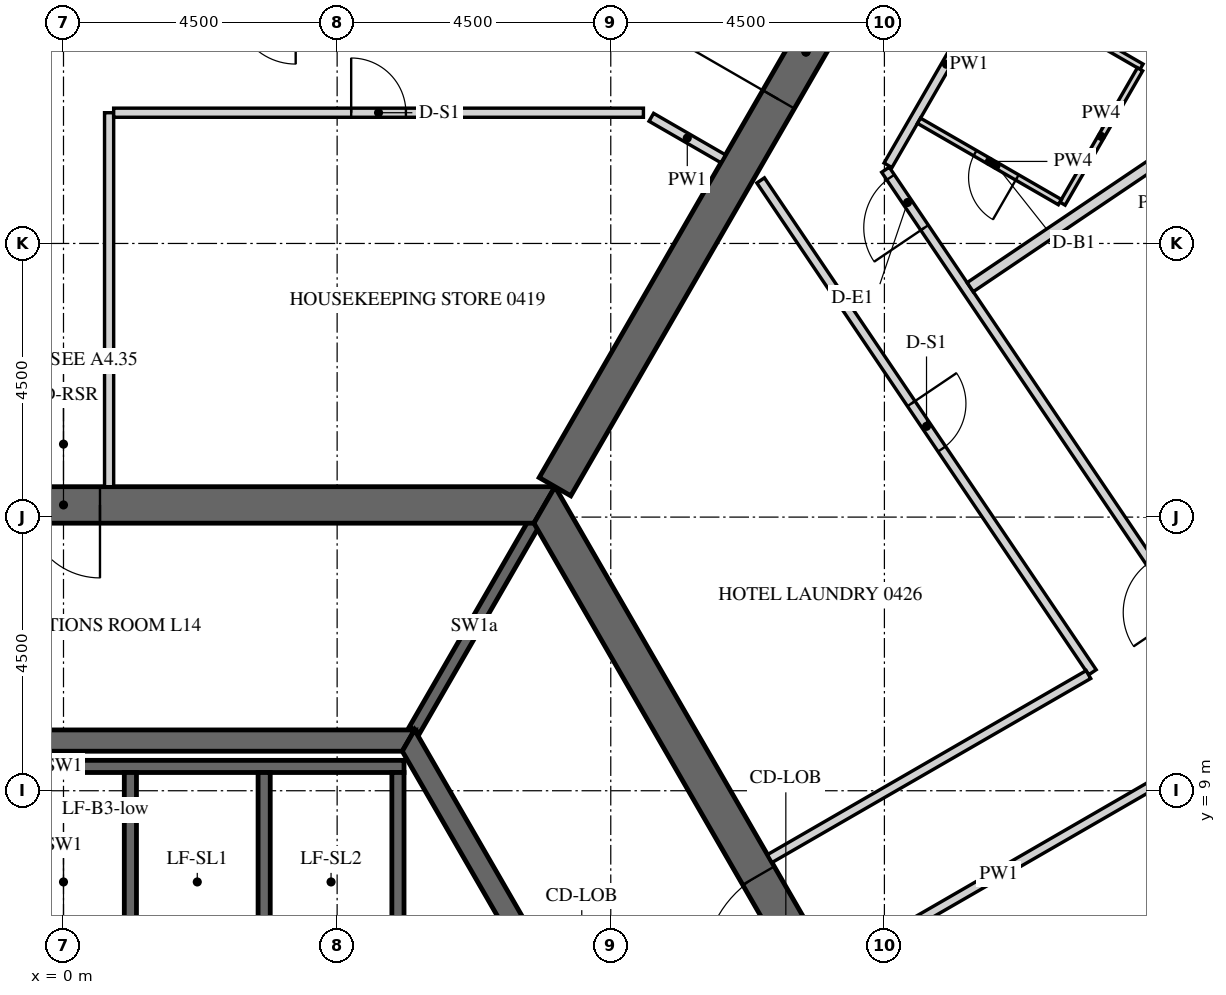
"""IFC4 building model, lengths in metres.
Left out: names, types, materials, properties, quantities, classifications, styles, units other than length and angle.
Written with IfcOpenShell. Run it as: python <this file> out.ifc"""

import sys

from ifc_helpers import new_model, si_unit, direction, frame, frame_2d, origin, place, context, subcontext, project, spatial, polyline, rectangle, outline, extrude, element, fill, save


model = new_model("IFC4")
c1 = context("Model", 3, precision=1e-05, world=origin(), true_north=direction((0.0, 1.0)))
c2 = subcontext(c1, "Body", "Model", "MODEL_VIEW")
j1 = project(units=[si_unit("LENGTHUNIT", "METRE"), si_unit("PLANEANGLEUNIT", "RADIAN")], contexts=[c1])
p1 = place(None, origin())
s1 = spatial("IfcSite", under=j1, at=p1, CompositionType="ELEMENT")
p2 = place(p1, origin())
s2 = spatial("IfcBuilding", under=s1, at=p2, CompositionType="ELEMENT")
p3 = place(p2, frame((0.0, 0.0, 68.7)))
s3 = spatial("IfcBuildingStorey", under=s2, at=p3, CompositionType="ELEMENT", Elevation=68.7)
p4 = place(p3, frame((33.728, 3.153, -0.15), z_axis=(0.0, 0.0, 1.0), x_axis=(-0.559192411416, 0.82903790445, 0.0)))
e1 = element("IfcWall", 1, at=p4, inside=s3, PredefinedType="SOLIDWALL", context=c2, shape_type="SweptSolid", body=[
    extrude(outline(polyline([(-0.026, -0.275), (30.093, -0.275), (30.048, 0.275), (0.026, 0.275), (-0.026, -0.275)])), origin(), (0.0, 0.0, 1.0), 3.9),
])
p5 = place(p4, frame((1.236, 0.0, 1.05)))
e2 = element("IfcOpeningElement", 2, at=p5, cuts=e1, PredefinedType="OPENING", context=c2, shape_type="SweptSolid", body=[
    extrude(rectangle(XDim=2.4, YDim=2.4, at=frame_2d((1.2, 1.2))), frame((0.0, 0.285, 0.0), z_axis=(0.0, -1.0, 0.0), x_axis=(1.0, 0.0, 0.0)), (0.0, 0.0, 1.0), 0.57),
])
p6 = place(p4, frame((4.835, 0.0, 1.05)))
e3 = element("IfcOpeningElement", 3, at=p6, cuts=e1, PredefinedType="OPENING", context=c2, shape_type="SweptSolid", body=[
    extrude(rectangle(XDim=2.4, YDim=2.4, at=frame_2d((1.2, 1.2))), frame((0.0, 0.285, 0.0), z_axis=(0.0, -1.0, 0.0), x_axis=(1.0, 0.0, 0.0)), (0.0, 0.0, 1.0), 0.57),
])
p7 = place(p4, frame((8.436, 0.0, 1.05)))
e4 = element("IfcOpeningElement", 4, at=p7, cuts=e1, PredefinedType="OPENING", context=c2, shape_type="SweptSolid", body=[
    extrude(rectangle(XDim=2.4, YDim=2.4, at=frame_2d((1.2, 1.2))), frame((0.0, 0.285, 0.0), z_axis=(0.0, -1.0, 0.0), x_axis=(1.0, 0.0, 0.0)), (0.0, 0.0, 1.0), 0.57),
])
p8 = place(p4, frame((12.035, 0.0, 1.05)))
e5 = element("IfcOpeningElement", 5, at=p8, cuts=e1, PredefinedType="OPENING", context=c2, shape_type="SweptSolid", body=[
    extrude(rectangle(XDim=2.4, YDim=2.4, at=frame_2d((1.2, 1.2))), frame((0.0, 0.285, 0.0), z_axis=(0.0, -1.0, 0.0), x_axis=(1.0, 0.0, 0.0)), (0.0, 0.0, 1.0), 0.57),
])
p9 = place(p4, frame((15.635, 0.0, 1.05)))
e6 = element("IfcOpeningElement", 6, at=p9, cuts=e1, PredefinedType="OPENING", context=c2, shape_type="SweptSolid", body=[
    extrude(rectangle(XDim=2.4, YDim=2.4, at=frame_2d((1.2, 1.2))), frame((0.0, 0.285, 0.0), z_axis=(0.0, -1.0, 0.0), x_axis=(1.0, 0.0, 0.0)), (0.0, 0.0, 1.0), 0.57),
])
p10 = place(p4, frame((19.236, 0.0, 1.05)))
e7 = element("IfcOpeningElement", 7, at=p10, cuts=e1, PredefinedType="OPENING", context=c2, shape_type="SweptSolid", body=[
    extrude(rectangle(XDim=2.4, YDim=2.4, at=frame_2d((1.2, 1.2))), frame((0.0, 0.285, 0.0), z_axis=(0.0, -1.0, 0.0), x_axis=(1.0, 0.0, 0.0)), (0.0, 0.0, 1.0), 0.57),
])
p11 = place(p4, frame((22.835, 0.0, 1.05)))
e8 = element("IfcOpeningElement", 8, at=p11, cuts=e1, PredefinedType="OPENING", context=c2, shape_type="SweptSolid", body=[
    extrude(rectangle(XDim=2.4, YDim=2.4, at=frame_2d((1.2, 1.2))), frame((0.0, 0.285, 0.0), z_axis=(0.0, -1.0, 0.0), x_axis=(1.0, 0.0, 0.0)), (0.0, 0.0, 1.0), 0.57),
])
p12 = place(p4, frame((26.436, 0.0, 1.05)))
e9 = element("IfcOpeningElement", 9, at=p12, cuts=e1, PredefinedType="OPENING", context=c2, shape_type="SweptSolid", body=[
    extrude(rectangle(XDim=2.4, YDim=2.4, at=frame_2d((1.2, 1.2))), frame((0.0, 0.285, 0.0), z_axis=(0.0, -1.0, 0.0), x_axis=(1.0, 0.0, 0.0)), (0.0, 0.0, 1.0), 0.57),
])
p13 = place(p3, frame((15.819, 0.0, -0.15), z_axis=(0.0, 0.0, 1.0), x_axis=(-0.499999880136, 0.866025472988, 0.0)))
e10 = element("IfcWall", 10, at=p13, inside=s3, PredefinedType="SHEAR", context=c2, shape_type="SweptSolid", body=[
    extrude(outline(polyline([(-0.173, -0.3), (15.993, -0.3), (15.646, 0.3), (0.173, 0.3), (-0.173, -0.3)])), origin(), (0.0, 0.0, 1.0), 3.9),
])
p14 = place(p13, frame((6.981, 0.0, 0.15)))
e11 = element("IfcOpeningElement", 11, at=p14, cuts=e10, PredefinedType="OPENING", context=c2, shape_type="SweptSolid", body=[
    extrude(rectangle(XDim=1.8, YDim=2.4, at=frame_2d((0.9, 1.2))), frame((0.0, 0.31, 0.0), z_axis=(0.0, -1.0, 0.0), x_axis=(1.0, 0.0, 0.0)), (0.0, 0.0, 1.0), 0.62),
])
p15 = place(p3, frame((7.91, 13.7, -0.15), z_axis=(0.0, 0.0, 1.0), x_axis=(-1.0, 0.0, 0.0)))
e12 = element("IfcWall", 12, at=p15, inside=s3, PredefinedType="SHEAR", context=c2, shape_type="SweptSolid", body=[
    extrude(outline(polyline([(-0.173, -0.3), (15.993, -0.3), (15.646, 0.3), (0.173, 0.3), (-0.173, -0.3)])), origin(), (0.0, 0.0, 1.0), 3.9),
])
p16 = place(p15, frame((7.31, 0.0, 0.15)))
e13 = element("IfcOpeningElement", 13, at=p16, cuts=e12, PredefinedType="OPENING", context=c2, shape_type="SweptSolid", body=[
    extrude(rectangle(XDim=1.2, YDim=2.4, at=frame_2d((0.6, 1.2))), frame((0.0, 0.31, 0.0), z_axis=(0.0, -1.0, 0.0), x_axis=(1.0, 0.0, 0.0)), (0.0, 0.0, 1.0), 0.62),
])
p17 = place(p3, frame((8.083, 14.0, -0.15), z_axis=(0.0, 0.0, 1.0), x_axis=(0.499997680643, 0.866026742862, 0.0)))
e14 = element("IfcWall", 14, at=p17, inside=s3, PredefinedType="SHEAR", context=c2, shape_type="SweptSolid", body=[
    extrude(rectangle(XDim=16.509, YDim=0.6, at=frame_2d((8.254, 0.0))), origin(), (0.0, 0.0, 1.0), 3.9),
])
p18 = place(p17, frame((7.354, 0.0, 0.15)))
e15 = element("IfcOpeningElement", 15, at=p18, cuts=e14, PredefinedType="OPENING", context=c2, shape_type="SweptSolid", body=[
    extrude(rectangle(XDim=1.8, YDim=2.4, at=frame_2d((0.9, 1.2))), frame((0.0, 0.31, 0.0), z_axis=(0.0, -1.0, 0.0), x_axis=(1.0, 0.0, 0.0)), (0.0, 0.0, 1.0), 0.62),
])
p19 = place(p3, frame((11.345, 0.0, -0.15), z_axis=(0.0, 0.0, 1.0), x_axis=(-0.499995046907, 0.866028263435, 0.0)))
e16 = element("IfcWall", 16, at=p19, inside=s3, PredefinedType="SHEAR", context=c2, shape_type="SweptSolid", body=[
    extrude(outline(polyline([(-0.101, -0.175), (11.446, -0.175), (11.244, 0.175), (0.101, 0.175), (-0.101, -0.175)])), origin(), (0.0, 0.0, 1.0), 3.9),
])
p20 = place(p19, frame((4.744, 0.0, 0.15)))
e17 = element("IfcOpeningElement", 17, at=p20, cuts=e16, PredefinedType="OPENING", context=c2, shape_type="SweptSolid", body=[
    extrude(rectangle(XDim=1.8, YDim=2.4, at=frame_2d((0.9, 1.2))), frame((0.0, 0.185, 0.0), z_axis=(0.0, -1.0, 0.0), x_axis=(1.0, 0.0, 0.0)), (0.0, 0.0, 1.0), 0.37),
])
p21 = place(p3, frame((5.673, 9.825, -0.15), z_axis=(0.0, 0.0, 1.0), x_axis=(-1.0, 0.0, 0.0)))
e18 = element("IfcWall", 18, at=p21, inside=s3, PredefinedType="SHEAR", context=c2, shape_type="SweptSolid", body=[
    extrude(outline(polyline([(-0.101, -0.175), (11.446, -0.175), (11.244, 0.175), (0.101, 0.175), (-0.101, -0.175)])), origin(), (0.0, 0.0, 1.0), 3.9),
])
p22 = place(p3, frame((-5.6, 9.4, -0.25), z_axis=(0.0, 0.0, 1.0), x_axis=(1.0, 0.0, 0.0)))
e19 = element("IfcWall", 19, at=p22, inside=s3, PredefinedType="SHEAR", context=c2, shape_type="SweptSolid", body=[
    extrude(rectangle(XDim=11.2, YDim=0.2, at=frame_2d((5.6, 0.0))), origin(), (0.0, 0.0, 1.0), 3.9),
])
for number, where, z_axis, x_axis in (
    (20, (1.1, 6.4, -0.25), (0.0, 0.0, 1.0), (0.0, 1.0, 0.0)),
    (21, (3.3, 6.4, -0.25), (0.0, 0.0, 1.0), (0.0, 1.0, 0.0)),
    (22, (5.5, 6.4, -0.25), (0.0, 0.0, 1.0), (0.0, 1.0, 0.0)),
):
    element("IfcWall", number, at=place(p3, frame(where, z_axis=z_axis, x_axis=x_axis)), inside=s3, PredefinedType="SHEAR", context=c2, shape_type="SweptSolid", body=[
        extrude(rectangle(XDim=2.9, YDim=0.2, at=frame_2d((1.45, 0.0))), origin(), (0.0, 0.0, 1.0), 3.9),
    ])
p23 = place(p3, frame((5.773, 10.0, -0.15), z_axis=(0.0, 0.0, 1.0), x_axis=(0.500038251005, 0.86600331843, 0.0)))
e23 = element("IfcWall", 23, at=p23, inside=s3, PredefinedType="SHEAR", context=c2, shape_type="SweptSolid", body=[
    extrude(rectangle(XDim=3.926, YDim=0.2, at=frame_2d((1.963, 0.0))), origin(), (0.0, 0.0, 1.0), 3.9),
])
p24 = place(p3, frame((0.75, 14.0, 0.0), z_axis=(0.0, 0.0, 1.0), x_axis=(0.0, 1.0, 0.0)))
e24 = element("IfcWall", 24, at=p24, inside=s3, PredefinedType="PARTITIONING", context=c2, shape_type="SweptSolid", body=[
    extrude(rectangle(XDim=6.15, YDim=0.15, at=frame_2d((3.075, 0.0))), origin(), (0.0, 0.0, 1.0), 2.988),
])
p25 = place(p3, frame((0.825, 20.15, 0.0), z_axis=(0.0, 0.0, 1.0), x_axis=(1.0, 0.0, 0.0)))
e25 = element("IfcWall", 25, at=p25, inside=s3, PredefinedType="PARTITIONING", context=c2, shape_type="SweptSolid", body=[
    extrude(rectangle(XDim=8.712, YDim=0.15, at=frame_2d((4.356, 0.0))), origin(), (0.0, 0.0, 1.0), 2.988),
])
p26 = place(p25, frame((3.906, 0.0, 0.0)))
e26 = element("IfcOpeningElement", 26, at=p26, cuts=e25, PredefinedType="OPENING", context=c2, shape_type="SweptSolid", body=[
    extrude(rectangle(XDim=0.9, YDim=2.1, at=frame_2d((0.45, 1.05))), frame((0.0, 0.085, 0.0), z_axis=(0.0, -1.0, 0.0), x_axis=(1.0, 0.0, 0.0)), (0.0, 0.0, 1.0), 0.17),
])
p27 = place(p3, frame((9.667, 20.075, 0.0), z_axis=(0.0, 0.0, 1.0), x_axis=(0.866000994684, -0.500042275419, 0.0)))
e27 = element("IfcWall", 27, at=p27, inside=s3, PredefinedType="PARTITIONING", context=c2, shape_type="SweptSolid", body=[
    extrude(rectangle(XDim=1.366, YDim=0.15, at=frame_2d((0.683, 0.0))), origin(), (0.0, 0.0, 1.0), 2.988),
])
p28 = place(p3, frame((25.821, 0.972, 0.0), z_axis=(0.0, 0.0, 1.0), x_axis=(-0.559193816298, 0.829036956845, 0.0)))
e28 = element("IfcWall", 28, at=p28, inside=s3, PredefinedType="PARTITIONING", context=c2, shape_type="SweptSolid", body=[
    extrude(rectangle(XDim=22.002, YDim=0.15, at=frame_2d((11.001, 0.0))), origin(), (0.0, 0.0, 1.0), 2.988),
])
p29 = place(p28, frame((3.269, 0.0, 0.0)))
e29 = element("IfcOpeningElement", 29, at=p29, cuts=e28, PredefinedType="OPENING", context=c2, shape_type="SweptSolid", body=[
    extrude(rectangle(XDim=1.0, YDim=2.1, at=frame_2d((0.5, 1.05))), frame((0.0, 0.085, 0.0), z_axis=(0.0, -1.0, 0.0), x_axis=(1.0, 0.0, 0.0)), (0.0, 0.0, 1.0), 0.17),
])
p30 = place(p28, frame((13.221, 0.0, 0.0)))
e30 = element("IfcOpeningElement", 30, at=p30, cuts=e28, PredefinedType="OPENING", context=c2, shape_type="SweptSolid", body=[
    extrude(rectangle(XDim=1.0, YDim=2.1, at=frame_2d((0.5, 1.05))), frame((0.0, 0.085, 0.0), z_axis=(0.0, -1.0, 0.0), x_axis=(1.0, 0.0, 0.0)), (0.0, 0.0, 1.0), 0.17),
])
p31 = place(p28, frame((20.852, 0.0, 0.0)))
e31 = element("IfcOpeningElement", 31, at=p31, cuts=e28, PredefinedType="OPENING", context=c2, shape_type="SweptSolid", body=[
    extrude(rectangle(XDim=1.0, YDim=2.1, at=frame_2d((0.5, 1.05))), frame((0.0, 0.085, 0.0), z_axis=(0.0, -1.0, 0.0), x_axis=(1.0, 0.0, 0.0)), (0.0, 0.0, 1.0), 0.17),
])
p32 = place(p3, frame((13.559, 19.285, 0.0), z_axis=(0.0, 0.0, 1.0), x_axis=(0.499975646431, 0.866039463868, 0.0)))
e32 = element("IfcWall", 32, at=p32, inside=s3, PredefinedType="PARTITIONING", context=c2, shape_type="SweptSolid", body=[
    extrude(rectangle(XDim=3.84, YDim=0.15, at=frame_2d((1.92, 0.0))), origin(), (0.0, 0.0, 1.0), 2.988),
])
p33 = place(p3, frame((12.664, 6.066, 0.0), z_axis=(0.0, 0.0, 1.0), x_axis=(0.866036561919, 0.499980673046, 0.0)))
e33 = element("IfcWall", 33, at=p33, inside=s3, PredefinedType="PARTITIONING", context=c2, shape_type="SweptSolid", body=[
    extrude(rectangle(XDim=6.275, YDim=0.15, at=frame_2d((3.137, 0.0))), origin(), (0.0, 0.0, 1.0), 2.988),
])
p34 = place(p3, frame((11.465, 19.037, 0.0), z_axis=(0.0, 0.0, 1.0), x_axis=(0.559196064773, -0.829035440221, 0.0)))
e34 = element("IfcWall", 34, at=p34, inside=s3, PredefinedType="PARTITIONING", context=c2, shape_type="SweptSolid", body=[
    extrude(rectangle(XDim=9.757, YDim=0.15, at=frame_2d((4.878, 0.0))), origin(), (0.0, 0.0, 1.0), 2.988),
])
p35 = place(p34, frame((4.428, 0.0, 0.0)))
e35 = element("IfcOpeningElement", 35, at=p35, cuts=e34, PredefinedType="OPENING", context=c2, shape_type="SweptSolid", body=[
    extrude(rectangle(XDim=0.9, YDim=2.1, at=frame_2d((0.45, 1.05))), frame((0.0, 0.085, 0.0), z_axis=(0.0, -1.0, 0.0), x_axis=(1.0, 0.0, 0.0)), (0.0, 0.0, 1.0), 0.17),
])
p36 = place(p3, frame((16.855, 10.911, 0.0), z_axis=(0.0, 0.0, 1.0), x_axis=(-0.866020343444, -0.500008764664, 0.0)))
e36 = element("IfcWall", 36, at=p36, inside=s3, PredefinedType="PARTITIONING", context=c2, shape_type="SweptSolid", body=[
    extrude(rectangle(XDim=6.053, YDim=0.15, at=frame_2d((3.026, 0.0))), origin(), (0.0, 0.0, 1.0), 2.988),
])
p37 = place(p3, frame((21.066, 21.433, 0.0), z_axis=(0.0, 0.0, 1.0), x_axis=(-0.829028170871, -0.559206841788, 0.0)))
e37 = element("IfcWall", 37, at=p37, inside=s3, PredefinedType="PARTITIONING", context=c2, shape_type="SweptSolid", body=[
    extrude(rectangle(XDim=7.425, YDim=0.18, at=frame_2d((3.712, 0.0))), origin(), (0.0, 0.0, 1.0), 2.988),
])
p38 = place(p3, frame((15.369, 22.27, 0.0), z_axis=(0.0, 0.0, 1.0), x_axis=(0.866034909742, -0.499983534837, 0.0)))
e38 = element("IfcWall", 38, at=p38, inside=s3, PredefinedType="PARTITIONING", context=c2, shape_type="SweptSolid", body=[
    extrude(rectangle(XDim=2.725, YDim=0.1, at=frame_2d((1.363, 0.0))), origin(), (0.0, 0.0, 1.0), 2.988),
])
p39 = place(p3, frame((17.704, 20.864, 0.0), z_axis=(0.0, 0.0, 1.0), x_axis=(-0.499948979701, -0.866054858364, 0.0)))
e39 = element("IfcWall", 39, at=p39, inside=s3, PredefinedType="PARTITIONING", context=c2, shape_type="SweptSolid", body=[
    extrude(rectangle(XDim=2.55, YDim=0.1, at=frame_2d((1.275, 0.0))), origin(), (0.0, 0.0, 1.0), 2.988),
])
p40 = place(p3, frame((16.385, 18.68, 0.0), z_axis=(0.0, 0.0, 1.0), x_axis=(-0.86604424267, 0.499967368674, 0.0)))
e40 = element("IfcWall", 40, at=p40, inside=s3, PredefinedType="PARTITIONING", context=c2, shape_type="SweptSolid", body=[
    extrude(rectangle(XDim=2.675, YDim=0.1, at=frame_2d((1.337, 0.0))), origin(), (0.0, 0.0, 1.0), 2.988),
])
p41 = place(p40, frame((0.81, 0.0, 0.0)))
e41 = element("IfcOpeningElement", 41, at=p41, cuts=e40, PredefinedType="OPENING", context=c2, shape_type="SweptSolid", body=[
    extrude(rectangle(XDim=0.8, YDim=2.1, at=frame_2d((0.4, 1.05))), frame((0.0, 0.06, 0.0), z_axis=(0.0, -1.0, 0.0), x_axis=(1.0, 0.0, 0.0)), (0.0, 0.0, 1.0), 0.12),
])
p42 = place(p14, origin())
e42 = element("IfcDoor", 42, at=p42, inside=s3, OperationType="DOUBLE_DOOR_SINGLE_SWING", PredefinedType="DOOR", context=c2, shape_type="SweptSolid", body=[
    extrude(rectangle(XDim=1.8, YDim=2.4, at=frame_2d((0.9, 1.2))), frame((0.0, 0.025, 0.0), z_axis=(0.0, -1.0, 0.0), x_axis=(1.0, 0.0, 0.0)), (0.0, 0.0, 1.0), 0.05),
])
fill(e11, e42)
p43 = place(p16, origin())
e43 = element("IfcDoor", 43, at=p43, inside=s3, OperationType="SINGLE_SWING_LEFT", PredefinedType="DOOR", context=c2, shape_type="SweptSolid", body=[
    extrude(rectangle(XDim=1.2, YDim=2.4, at=frame_2d((0.6, 1.2))), frame((0.0, 0.025, 0.0), z_axis=(0.0, -1.0, 0.0), x_axis=(1.0, 0.0, 0.0)), (0.0, 0.0, 1.0), 0.05),
])
fill(e13, e43)
p44 = place(p18, origin())
e44 = element("IfcDoor", 44, at=p44, inside=s3, OperationType="DOUBLE_DOOR_SINGLE_SWING", PredefinedType="DOOR", context=c2, shape_type="SweptSolid", body=[
    extrude(rectangle(XDim=1.8, YDim=2.4, at=frame_2d((0.9, 1.2))), frame((0.0, 0.025, 0.0), z_axis=(0.0, -1.0, 0.0), x_axis=(1.0, 0.0, 0.0)), (0.0, 0.0, 1.0), 0.05),
])
fill(e15, e44)
p45 = place(p31, origin())
e45 = element("IfcDoor", 45, at=p45, inside=s3, OperationType="SINGLE_SWING_LEFT", PredefinedType="DOOR", context=c2, shape_type="SweptSolid", body=[
    extrude(rectangle(XDim=1.0, YDim=2.1, at=frame_2d((0.5, 1.05))), frame((0.0, 0.025, 0.0), z_axis=(0.0, -1.0, 0.0), x_axis=(1.0, 0.0, 0.0)), (0.0, 0.0, 1.0), 0.05),
])
fill(e31, e45)
p46 = place(p41, origin())
e46 = element("IfcDoor", 46, at=p46, inside=s3, OperationType="SINGLE_SWING_RIGHT", PredefinedType="DOOR", context=c2, shape_type="SweptSolid", body=[
    extrude(rectangle(XDim=0.8, YDim=2.1, at=frame_2d((0.4, 1.05))), frame((0.0, 0.025, 0.0), z_axis=(0.0, -1.0, 0.0), x_axis=(1.0, 0.0, 0.0)), (0.0, 0.0, 1.0), 0.05),
])
fill(e41, e46)
p47 = place(p26, origin())
e47 = element("IfcDoor", 47, at=p47, inside=s3, OperationType="SINGLE_SWING_RIGHT", PredefinedType="DOOR", context=c2, shape_type="SweptSolid", body=[
    extrude(rectangle(XDim=0.9, YDim=2.1, at=frame_2d((0.45, 1.05))), frame((0.0, 0.025, 0.0), z_axis=(0.0, -1.0, 0.0), x_axis=(1.0, 0.0, 0.0)), (0.0, 0.0, 1.0), 0.05),
])
fill(e26, e47)
p48 = place(p35, origin())
e48 = element("IfcDoor", 48, at=p48, inside=s3, OperationType="SINGLE_SWING_RIGHT", PredefinedType="DOOR", context=c2, shape_type="SweptSolid", body=[
    extrude(rectangle(XDim=0.9, YDim=2.1, at=frame_2d((0.45, 1.05))), frame((0.0, 0.025, 0.0), z_axis=(0.0, -1.0, 0.0), x_axis=(1.0, 0.0, 0.0)), (0.0, 0.0, 1.0), 0.05),
])
fill(e35, e48)
save(model, sys.argv[1])
